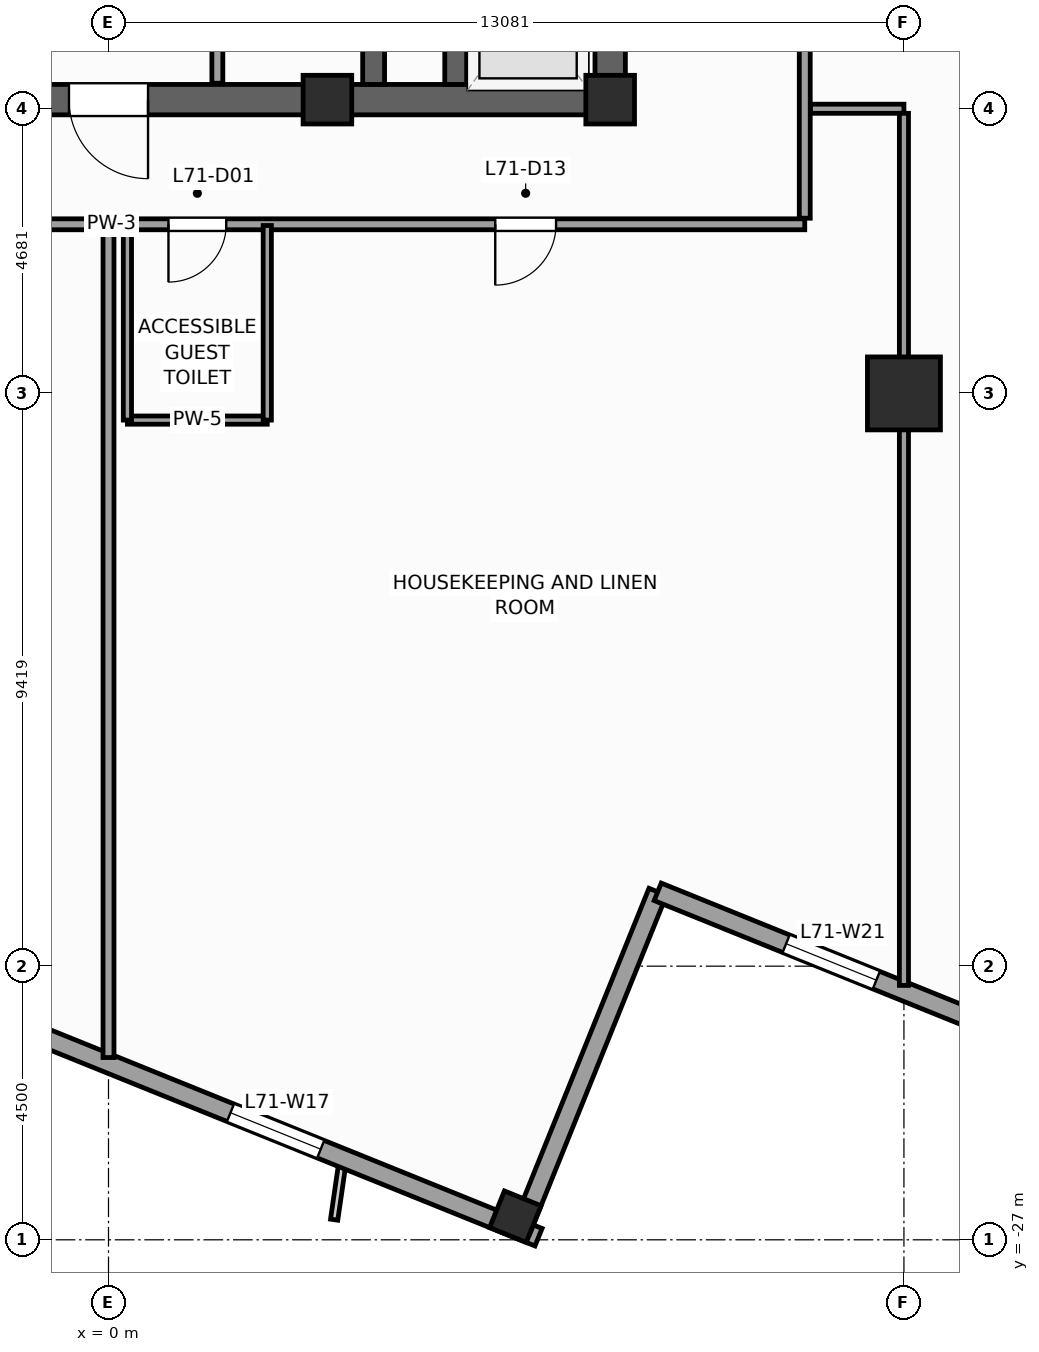
"""IFC4 building model, lengths in metres.
Left out: names, types, materials, properties, quantities, classifications, styles, units other than length and angle.
Written with IfcOpenShell. Run it as: python <this file> out.ifc"""

import sys

from ifc_helpers import new_model, si_unit, direction, frame, frame_2d, origin, origin_2d, place, context, subcontext, project, spatial, rectangle, extrude, source, transform, mapped, element, fill, save


model = new_model("IFC4")
c1 = context("Model", 3, precision=1e-05, world=origin(), true_north=direction((0.0, 1.0)))
c2 = subcontext(c1, "Body", "Model", "MODEL_VIEW")
j1 = project(units=[si_unit("LENGTHUNIT", "METRE"), si_unit("PLANEANGLEUNIT", "RADIAN")], contexts=[c1])
p1 = place(None, origin())
s1 = spatial("IfcSite", under=j1, at=p1, CompositionType="ELEMENT")
p2 = place(p1, origin())
s2 = spatial("IfcBuilding", under=s1, at=p2, CompositionType="ELEMENT")
p3 = place(p2, frame((0.0, 0.0, 290.4)))
s3 = spatial("IfcBuildingStorey", under=s2, at=p3, CompositionType="ELEMENT", Elevation=290.4)
p4 = place(p3, frame((-8.5, -8.25, 0.0), z_axis=(0.0, 0.0, 1.0), x_axis=(1.0, 0.0, 0.0)))
e1 = element("IfcWall", 1, at=p4, inside=s3, PredefinedType="SHEAR", context=c2, shape_type="SweptSolid", body=[
    extrude(rectangle(XDim=17.0, YDim=0.5, at=frame_2d((8.5, 0.0))), origin(), (0.0, 0.0, 1.0), 3.6),
])
p5 = place(p4, frame((7.85, 0.0, 0.0)))
e2 = element("IfcOpeningElement", 2, at=p5, cuts=e1, PredefinedType="OPENING", context=c2, shape_type="SweptSolid", body=[
    extrude(rectangle(XDim=1.3, YDim=2.2, at=frame_2d((0.65, 1.1))), frame((0.0, 0.26, 0.0), z_axis=(0.0, -1.0, 0.0), x_axis=(1.0, 0.0, 0.0)), (0.0, 0.0, 1.0), 0.52),
])
p6 = place(p3, frame((8.25, -8.0, 0.0), z_axis=(0.0, 0.0, 1.0), x_axis=(0.0, 1.0, 0.0)))
e3 = element("IfcWall", 3, at=p6, inside=s3, PredefinedType="SHEAR", context=c2, shape_type="SweptSolid", body=[
    extrude(rectangle(XDim=16.0, YDim=0.5, at=frame_2d((8.0, 0.0))), origin(), (0.0, 0.0, 1.0), 3.6),
])
p7 = place(p6, frame((4.69, 0.0, 0.0)))
e4 = element("IfcOpeningElement", 4, at=p7, cuts=e3, PredefinedType="OPENING", context=c2, shape_type="SweptSolid", body=[
    extrude(rectangle(XDim=1.3, YDim=2.2, at=frame_2d((0.65, 1.1))), frame((0.0, 0.26, 0.0), z_axis=(0.0, -1.0, 0.0), x_axis=(1.0, 0.0, 0.0)), (0.0, 0.0, 1.0), 0.52),
])
p8 = place(p3, frame((4.36, -8.0, 0.0), z_axis=(0.0, 0.0, 1.0), x_axis=(0.0, 1.0, 0.0)))
e5 = element("IfcWall", 5, at=p8, inside=s3, PredefinedType="SHEAR", context=c2, shape_type="SweptSolid", body=[
    extrude(rectangle(XDim=16.0, YDim=0.36, at=frame_2d((8.0, 0.0))), origin(), (0.0, 0.0, 1.0), 3.6),
])
p9 = place(p3, frame((5.71, -8.0, 0.0), z_axis=(0.0, 0.0, 1.0), x_axis=(0.0, 1.0, 0.0)))
e6 = element("IfcWall", 6, at=p9, inside=s3, PredefinedType="SHEAR", context=c2, shape_type="SweptSolid", body=[
    extrude(rectangle(XDim=2.54, YDim=0.36, at=frame_2d((1.27, 0.0))), origin(), (0.0, 0.0, 1.0), 3.6),
])
m1 = source(origin(), c2, "Body", "SweptSolid", [
    extrude(rectangle(XDim=0.8, YDim=0.8, at=origin_2d()), origin(), (0.0, 0.0, 1.0), 3.6),
])
for number, where, z_axis, x_axis in (
    (7, (8.25, -8.25, 0.0), (0.0, 0.0, 1.0), (1.0, 0.0, 0.0)),
    (8, (3.6, -8.25, 0.0), (0.0, 0.0, 1.0), (1.0, 0.0, 0.0)),
):
    element("IfcColumn", number, at=place(p3, frame(where, z_axis=z_axis, x_axis=x_axis)), inside=s3, PredefinedType="PILASTER", context=c2, shape_type="MappedRepresentation", body=[
        mapped(m1, transform((0.0, 0.0, 0.0), scale=1.0)),
    ])
m2 = source(origin(), c2, "Body", "SweptSolid", [
    extrude(rectangle(XDim=1.2, YDim=1.2, at=origin_2d()), origin(), (0.0, 0.0, 1.0), 3.6),
])
p10 = place(p3, frame((13.081, -13.081, 0.0), z_axis=(0.0, 0.0, 1.0), x_axis=(1.0, 0.0, 0.0)))
e9 = element("IfcColumn", 9, at=p10, inside=s3, PredefinedType="COLUMN", context=c2, shape_type="MappedRepresentation", body=[
    mapped(m2, transform((0.0, 0.0, 0.0), scale=1.0)),
])
m3 = source(origin(), c2, "Body", "SweptSolid", [
    extrude(rectangle(XDim=0.65, YDim=0.65, at=origin_2d()), origin(), (0.0, 0.0, 1.0), 3.6),
])
p11 = place(p3, frame((6.69, -26.62, 0.0), z_axis=(0.0, 0.0, 1.0), x_axis=(0.374606593416, 0.927183854567, 0.0)))
e10 = element("IfcColumn", 10, at=p11, inside=s3, PredefinedType="COLUMN", context=c2, shape_type="MappedRepresentation", body=[
    mapped(m3, transform((0.0, 0.0, 0.0), scale=1.0)),
])
p12 = place(p3, frame((-23.813, -14.479, 0.0), z_axis=(0.0, 0.0, 1.0), x_axis=(0.927182657188, -0.374609557019, 0.0)))
e11 = element("IfcWall", 11, at=p12, inside=s3, PredefinedType="STANDARD", context=c2, shape_type="SweptSolid", body=[
    extrude(rectangle(XDim=33.31, YDim=0.31, at=frame_2d((16.655, 0.0))), origin(), (0.0, 0.0, 1.0), 2.75),
])
p13 = place(p12, frame((3.197, 0.0, 0.47)))
e12 = element("IfcOpeningElement", 12, at=p13, cuts=e11, PredefinedType="OPENING", context=c2, shape_type="SweptSolid", body=[
    extrude(rectangle(XDim=1.6, YDim=2.1, at=frame_2d((0.8, 1.05))), frame((0.0, 0.165, 0.0), z_axis=(0.0, -1.0, 0.0), x_axis=(1.0, 0.0, 0.0)), (0.0, 0.0, 1.0), 0.33),
])
p14 = place(p12, frame((8.86, 0.0, 0.47)))
e13 = element("IfcOpeningElement", 13, at=p14, cuts=e11, PredefinedType="OPENING", context=c2, shape_type="SweptSolid", body=[
    extrude(rectangle(XDim=1.6, YDim=2.1, at=frame_2d((0.8, 1.05))), frame((0.0, 0.165, 0.0), z_axis=(0.0, -1.0, 0.0), x_axis=(1.0, 0.0, 0.0)), (0.0, 0.0, 1.0), 0.33),
])
p15 = place(p12, frame((14.439, 0.0, 0.47)))
e14 = element("IfcOpeningElement", 14, at=p15, cuts=e11, PredefinedType="OPENING", context=c2, shape_type="SweptSolid", body=[
    extrude(rectangle(XDim=1.6, YDim=2.1, at=frame_2d((0.8, 1.05))), frame((0.0, 0.165, 0.0), z_axis=(0.0, -1.0, 0.0), x_axis=(1.0, 0.0, 0.0)), (0.0, 0.0, 1.0), 0.33),
])
p16 = place(p12, frame((21.851, 0.0, 0.47)))
e15 = element("IfcOpeningElement", 15, at=p16, cuts=e11, PredefinedType="OPENING", context=c2, shape_type="SweptSolid", body=[
    extrude(rectangle(XDim=1.6, YDim=2.1, at=frame_2d((0.8, 1.05))), frame((0.0, 0.165, 0.0), z_axis=(0.0, -1.0, 0.0), x_axis=(1.0, 0.0, 0.0)), (0.0, 0.0, 1.0), 0.33),
])
p17 = place(p12, frame((27.847, 0.0, 0.47)))
e16 = element("IfcOpeningElement", 16, at=p17, cuts=e11, PredefinedType="OPENING", context=c2, shape_type="SweptSolid", body=[
    extrude(rectangle(XDim=1.6, YDim=2.1, at=frame_2d((0.8, 1.05))), frame((0.0, 0.165, 0.0), z_axis=(0.0, -1.0, 0.0), x_axis=(1.0, 0.0, 0.0)), (0.0, 0.0, 1.0), 0.33),
])
p18 = place(p3, frame((6.784, -26.841, 0.0), z_axis=(0.0, 0.0, 1.0), x_axis=(0.374636620962, 0.927171722085, 0.0)))
e17 = element("IfcWall", 17, at=p18, inside=s3, PredefinedType="STANDARD", context=c2, shape_type="SweptSolid", body=[
    extrude(rectangle(XDim=6.0, YDim=0.31, at=frame_2d((3.0, 0.0))), origin(), (0.0, 0.0, 1.0), 2.65),
])
p19 = place(p3, frame((9.032, -21.278, 0.0), z_axis=(0.0, 0.0, 1.0), x_axis=(0.927185411764, -0.374602739196, 0.0)))
e18 = element("IfcWall", 18, at=p19, inside=s3, PredefinedType="STANDARD", context=c2, shape_type="SweptSolid", body=[
    extrude(rectangle(XDim=6.155, YDim=0.31, at=frame_2d((3.078, 0.0))), origin(), (0.0, 0.0, 1.0), 3.35),
])
p20 = place(p19, frame((2.278, 0.0, 0.47)))
e19 = element("IfcOpeningElement", 19, at=p20, cuts=e18, PredefinedType="OPENING", context=c2, shape_type="SweptSolid", body=[
    extrude(rectangle(XDim=1.6, YDim=2.1, at=frame_2d((0.8, 1.05))), frame((0.0, 0.165, 0.0), z_axis=(0.0, -1.0, 0.0), x_axis=(1.0, 0.0, 0.0)), (0.0, 0.0, 1.0), 0.33),
])
p21 = place(p3, frame((1.79, -7.98, 0.0), z_axis=(0.0, 0.0, 1.0), x_axis=(0.0, 1.0, 0.0)))
e20 = element("IfcWall", 20, at=p21, inside=s3, PredefinedType="PARTITIONING", context=c2, shape_type="SweptSolid", body=[
    extrude(rectangle(XDim=12.38, YDim=0.18, at=frame_2d((6.19, 0.0))), origin(), (0.0, 0.0, 1.0), 3.35),
])
p22 = place(p21, frame((8.8, 0.0, 0.0)))
e21 = element("IfcOpeningElement", 21, at=p22, cuts=e20, PredefinedType="OPENING", context=c2, shape_type="SweptSolid", body=[
    extrude(rectangle(XDim=1.1, YDim=2.2, at=frame_2d((0.55, 1.1))), frame((0.0, 0.1, 0.0), z_axis=(0.0, -1.0, 0.0), x_axis=(1.0, 0.0, 0.0)), (0.0, 0.0, 1.0), 0.2),
])
p23 = place(p21, frame((10.86, 0.0, 0.0)))
e22 = element("IfcOpeningElement", 22, at=p23, cuts=e20, PredefinedType="OPENING", context=c2, shape_type="SweptSolid", body=[
    extrude(rectangle(XDim=1.1, YDim=2.2, at=frame_2d((0.55, 1.1))), frame((0.0, 0.1, 0.0), z_axis=(0.0, -1.0, 0.0), x_axis=(1.0, 0.0, 0.0)), (0.0, 0.0, 1.0), 0.2),
])
p24 = place(p21, frame((1.4, 0.0, 0.0)))
e23 = element("IfcOpeningElement", 23, at=p24, cuts=e20, PredefinedType="OPENING", context=c2, shape_type="SweptSolid", body=[
    extrude(rectangle(XDim=1.15, YDim=2.25, at=frame_2d((0.575, 1.125))), frame((0.0, 0.1, 0.0), z_axis=(0.0, -1.0, 0.0), x_axis=(1.0, 0.0, 0.0)), (0.0, 0.0, 1.0), 0.2),
])
p25 = place(p21, frame((5.6, 0.0, 0.0)))
e24 = element("IfcOpeningElement", 24, at=p25, cuts=e20, PredefinedType="OPENING", context=c2, shape_type="SweptSolid", body=[
    extrude(rectangle(XDim=1.15, YDim=2.25, at=frame_2d((0.575, 1.125))), frame((0.0, 0.1, 0.0), z_axis=(0.0, -1.0, 0.0), x_axis=(1.0, 0.0, 0.0)), (0.0, 0.0, 1.0), 0.2),
])
p26 = place(p3, frame((-11.35, -10.3, 0.0), z_axis=(0.0, 0.0, 1.0), x_axis=(1.0, 0.0, 0.0)))
e25 = element("IfcWall", 25, at=p26, inside=s3, PredefinedType="PARTITIONING", context=c2, shape_type="SweptSolid", body=[
    extrude(rectangle(XDim=22.8, YDim=0.18, at=frame_2d((11.4, 0.0))), origin(), (0.0, 0.0, 1.0), 3.35),
])
p27 = place(p26, frame((12.336, 0.0, 0.0)))
e26 = element("IfcOpeningElement", 26, at=p27, cuts=e25, PredefinedType="OPENING", context=c2, shape_type="SweptSolid", body=[
    extrude(rectangle(XDim=0.95, YDim=2.1, at=frame_2d((0.475, 1.05))), frame((0.0, 0.1, 0.0), z_axis=(0.0, -1.0, 0.0), x_axis=(1.0, 0.0, 0.0)), (0.0, 0.0, 1.0), 0.2),
])
p28 = place(p26, frame((17.71, 0.0, 0.0)))
e27 = element("IfcOpeningElement", 27, at=p28, cuts=e25, PredefinedType="OPENING", context=c2, shape_type="SweptSolid", body=[
    extrude(rectangle(XDim=1.0, YDim=2.15, at=frame_2d((0.5, 1.075))), frame((0.0, 0.1, 0.0), z_axis=(0.0, -1.0, 0.0), x_axis=(1.0, 0.0, 0.0)), (0.0, 0.0, 1.0), 0.2),
])
p29 = place(p26, frame((5.339, 0.0, 0.0)))
e28 = element("IfcOpeningElement", 28, at=p29, cuts=e25, PredefinedType="OPENING", context=c2, shape_type="SweptSolid", body=[
    extrude(rectangle(XDim=1.0, YDim=2.15, at=frame_2d((0.5, 1.075))), frame((0.0, 0.1, 0.0), z_axis=(0.0, -1.0, 0.0), x_axis=(1.0, 0.0, 0.0)), (0.0, 0.0, 1.0), 0.2),
])
p30 = place(p3, frame((11.45, -10.2, 0.0), z_axis=(0.0, 0.0, 1.0), x_axis=(0.0, 1.0, 0.0)))
e29 = element("IfcWall", 29, at=p30, inside=s3, PredefinedType="PARTITIONING", context=c2, shape_type="SweptSolid", body=[
    extrude(rectangle(XDim=22.55, YDim=0.18, at=frame_2d((11.275, 0.0))), origin(), (0.0, 0.0, 1.0), 3.35),
])
p31 = place(p30, frame((13.9, 0.0, 0.0)))
e30 = element("IfcOpeningElement", 30, at=p31, cuts=e29, PredefinedType="OPENING", context=c2, shape_type="SweptSolid", body=[
    extrude(rectangle(XDim=1.0, YDim=2.15, at=frame_2d((0.5, 1.075))), frame((0.0, 0.1, 0.0), z_axis=(0.0, -1.0, 0.0), x_axis=(1.0, 0.0, 0.0)), (0.0, 0.0, 1.0), 0.2),
])
p32 = place(p30, frame((5.5, 0.0, 0.0)))
e31 = element("IfcOpeningElement", 31, at=p32, cuts=e29, PredefinedType="OPENING", context=c2, shape_type="SweptSolid", body=[
    extrude(rectangle(XDim=1.0, YDim=2.15, at=frame_2d((0.5, 1.075))), frame((0.0, 0.1, 0.0), z_axis=(0.0, -1.0, 0.0), x_axis=(1.0, 0.0, 0.0)), (0.0, 0.0, 1.0), 0.2),
])
p33 = place(p3, frame((0.0, -10.395, 0.0), z_axis=(0.0, 0.0, 1.0), x_axis=(0.0, -1.0, 0.0)))
e32 = element("IfcWall", 32, at=p33, inside=s3, PredefinedType="PARTITIONING", context=c2, shape_type="SweptSolid", body=[
    extrude(rectangle(XDim=13.608, YDim=0.18, at=frame_2d((6.804, 0.0))), origin(), (0.0, 0.0, 1.0), 3.35),
])
p34 = place(p3, frame((11.545, -8.4, 0.0), z_axis=(0.0, 0.0, 1.0), x_axis=(1.0, 0.0, 0.0)))
e33 = element("IfcWall", 33, at=p34, inside=s3, PredefinedType="PARTITIONING", context=c2, shape_type="SweptSolid", body=[
    extrude(rectangle(XDim=1.536, YDim=0.15, at=frame_2d((0.768, 0.0))), origin(), (0.0, 0.0, 1.0), 3.35),
])
p35 = place(p3, frame((13.081, -8.475, 0.0), z_axis=(0.0, 0.0, 1.0), x_axis=(0.0, -1.0, 0.0)))
e34 = element("IfcWall", 34, at=p35, inside=s3, PredefinedType="PARTITIONING", context=c2, shape_type="SweptSolid", body=[
    extrude(rectangle(XDim=14.342, YDim=0.15, at=frame_2d((7.171, 0.0))), origin(), (0.0, 0.0, 1.0), 2.45),
])
p36 = place(p3, frame((0.311, -13.52, 0.0), z_axis=(0.0, 0.0, 1.0), x_axis=(1.0, 0.0, 0.0)))
e35 = element("IfcWall", 35, at=p36, inside=s3, PredefinedType="PARTITIONING", context=c2, shape_type="SweptSolid", body=[
    extrude(rectangle(XDim=2.3, YDim=0.135, at=frame_2d((1.15, 0.0))), origin(), (0.0, 0.0, 1.0), 3.35),
])
for number, where, z_axis, x_axis in (
    (36, (2.611, -13.52, 0.0), (0.0, 0.0, 1.0), (0.0, 1.0, 0.0)),
    (37, (0.311, -13.52, 0.0), (0.0, 0.0, 1.0), (0.0, 1.0, 0.0)),
):
    element("IfcWall", number, at=place(p3, frame(where, z_axis=z_axis, x_axis=x_axis)), inside=s3, PredefinedType="PARTITIONING", context=c2, shape_type="SweptSolid", body=[
        extrude(rectangle(XDim=3.2, YDim=0.135, at=frame_2d((1.6, 0.0))), origin(), (0.0, 0.0, 1.0), 3.35),
    ])
m4 = source(origin(), c2, "Body", "SweptSolid", [
    extrude(rectangle(XDim=1.6, YDim=2.1, at=frame_2d((0.8, 1.05))), frame((0.0, 0.03, 0.0), z_axis=(0.0, -1.0, 0.0), x_axis=(1.0, 0.0, 0.0)), (0.0, 0.0, 1.0), 0.06),
])
p37 = place(p17, origin())
e38 = element("IfcWindow", 38, at=p37, inside=s3, PartitioningType="SINGLE_PANEL", PredefinedType="WINDOW", context=c2, shape_type="MappedRepresentation", body=[
    mapped(m4, transform((0.0, 0.0, 0.0), scale=1.0)),
])
fill(e16, e38)
p38 = place(p20, origin())
e39 = element("IfcWindow", 39, at=p38, inside=s3, PartitioningType="SINGLE_PANEL", PredefinedType="WINDOW", context=c2, shape_type="MappedRepresentation", body=[
    mapped(m4, transform((0.0, 0.0, 0.0), scale=1.0)),
])
fill(e19, e39)
m5 = source(origin(), c2, "Body", "SweptSolid", [
    extrude(rectangle(XDim=1.3, YDim=2.2, at=frame_2d((0.65, 1.1))), frame((0.0, 0.025, 0.0), z_axis=(0.0, -1.0, 0.0), x_axis=(1.0, 0.0, 0.0)), (0.0, 0.0, 1.0), 0.05),
])
p39 = place(p5, frame((1.3, 0.0, 0.0), z_axis=(0.0, 0.0, 1.0), x_axis=(-1.0, 0.0, 0.0)))
e40 = element("IfcDoor", 40, at=p39, inside=s3, OperationType="SINGLE_SWING_RIGHT", PredefinedType="DOOR", context=c2, shape_type="MappedRepresentation", body=[
    mapped(m5, transform((0.0, 0.0, 0.0), scale=1.0)),
])
fill(e2, e40)
m6 = source(origin(), c2, "Body", "SweptSolid", [
    extrude(rectangle(XDim=0.95, YDim=2.1, at=frame_2d((0.475, 1.05))), frame((0.0, 0.025, 0.0), z_axis=(0.0, -1.0, 0.0), x_axis=(1.0, 0.0, 0.0)), (0.0, 0.0, 1.0), 0.05),
])
p40 = place(p27, frame((0.95, 0.0, 0.0), z_axis=(0.0, 0.0, 1.0), x_axis=(-1.0, 0.0, 0.0)))
e41 = element("IfcDoor", 41, at=p40, inside=s3, OperationType="SINGLE_SWING_LEFT", PredefinedType="DOOR", context=c2, shape_type="MappedRepresentation", body=[
    mapped(m6, transform((0.0, 0.0, 0.0), scale=1.0)),
])
fill(e26, e41)
m7 = source(origin(), c2, "Body", "SweptSolid", [
    extrude(rectangle(XDim=1.0, YDim=2.15, at=frame_2d((0.5, 1.075))), frame((0.0, 0.025, 0.0), z_axis=(0.0, -1.0, 0.0), x_axis=(1.0, 0.0, 0.0)), (0.0, 0.0, 1.0), 0.05),
])
p41 = place(p28, frame((1.0, 0.0, 0.0), z_axis=(0.0, 0.0, 1.0), x_axis=(-1.0, 0.0, 0.0)))
e42 = element("IfcDoor", 42, at=p41, inside=s3, OperationType="SINGLE_SWING_LEFT", PredefinedType="DOOR", context=c2, shape_type="MappedRepresentation", body=[
    mapped(m7, transform((0.0, 0.0, 0.0), scale=1.0)),
])
fill(e27, e42)
save(model, sys.argv[1])
